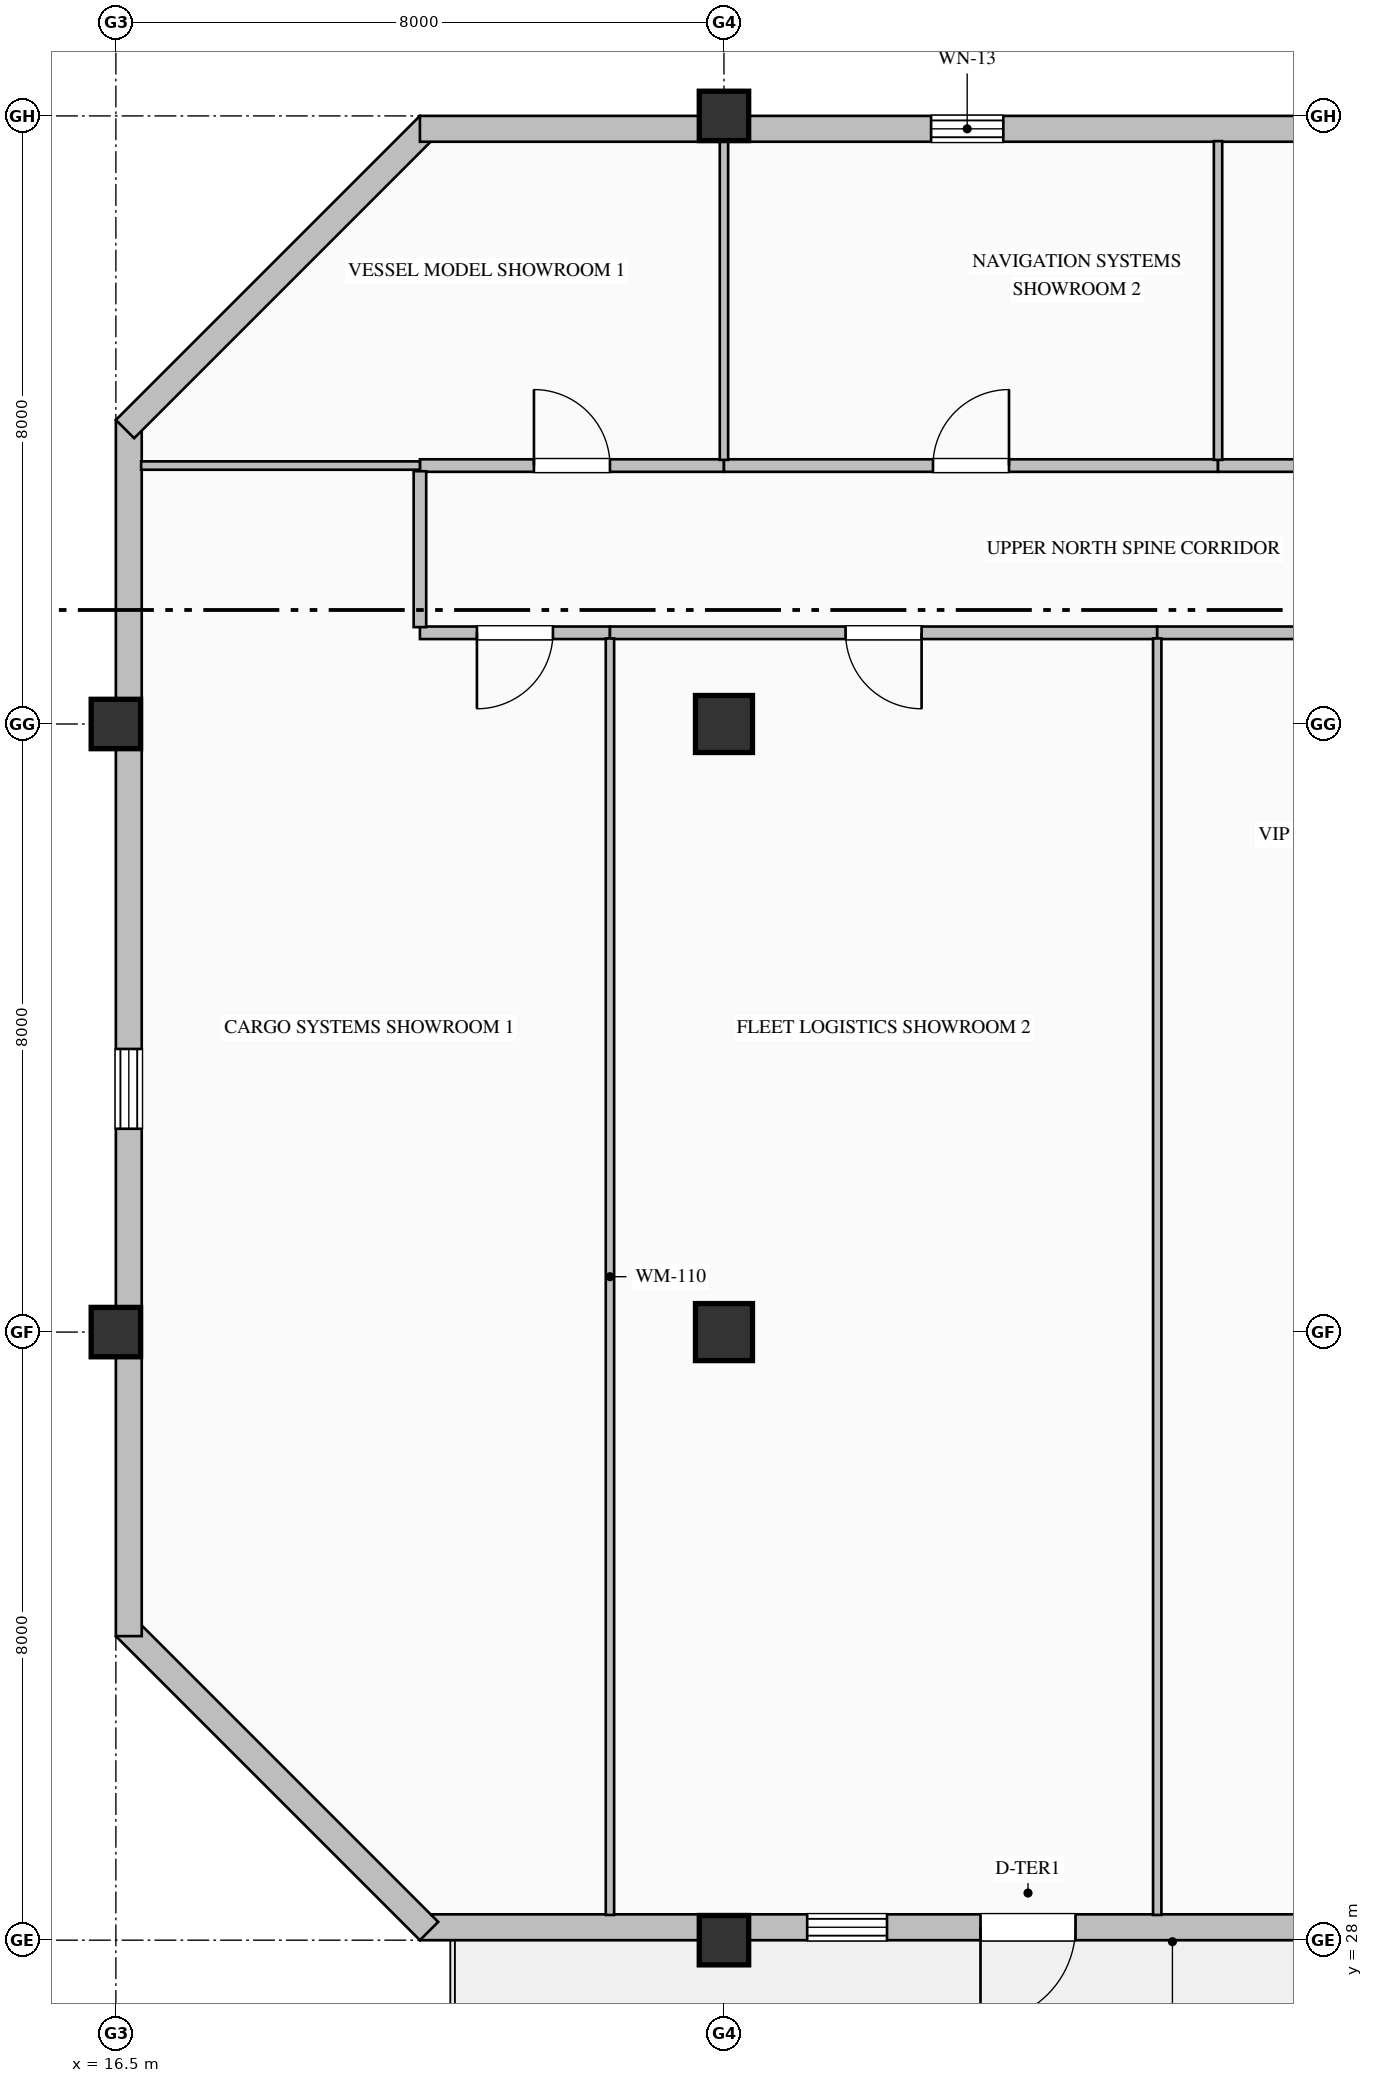
"""IFC4 building model, lengths in metres.
Left out: names, types, materials, properties, quantities, classifications, styles, units other than length and angle.
Written with IfcOpenShell. Run it as: python <this file> out.ifc"""

import sys

from ifc_helpers import new_model, si_unit, direction, frame, frame_2d, origin, origin_2d, place, context, subcontext, project, spatial, rectangle, hollow_rectangle, extrude, element, fill, save


model = new_model("IFC4")
c1 = context("Model", 3, precision=1e-05, world=origin(), true_north=direction((0.0, 1.0)))
c2 = subcontext(c1, "Body", "Model", "MODEL_VIEW")
j1 = project(units=[si_unit("LENGTHUNIT", "METRE"), si_unit("PLANEANGLEUNIT", "RADIAN")], contexts=[c1])
p1 = place(None, origin())
s1 = spatial("IfcSite", under=j1, at=p1, CompositionType="ELEMENT")
p2 = place(p1, origin())
s2 = spatial("IfcBuilding", under=s1, at=p2, CompositionType="ELEMENT")
p3 = place(p2, frame((0.0, 0.0, 359.2)))
s3 = spatial("IfcBuildingStorey", under=s2, at=p3, CompositionType="ELEMENT", Elevation=359.2)
for number, where, z_axis, x_axis in (
    (1, (16.5, 36.0, 0.0), (0.0, 0.0, 1.0), (1.0, 0.0, 0.0)),
    (2, (16.5, 44.0, 0.0), (0.0, 0.0, 1.0), (1.0, 0.0, 0.0)),
    (3, (24.5, 28.0, 0.0), (0.0, 0.0, 1.0), (1.0, 0.0, 0.0)),
):
    element("IfcColumn", number, at=place(p3, frame(where, z_axis=z_axis, x_axis=x_axis)), inside=s3, PredefinedType="COLUMN", context=c2, shape_type="SweptSolid", body=[
        extrude(hollow_rectangle(XDim=0.65, YDim=0.65, WallThickness=0.028, at=origin_2d()), origin(), (0.0, 0.0, 1.0), 4.0),
    ])
for number, where, z_axis, x_axis in (
    (4, (24.5, 36.0, 0.0), (0.0, 0.0, 1.0), (1.0, 0.0, 0.0)),
    (5, (24.5, 44.0, 0.0), (0.0, 0.0, 1.0), (1.0, 0.0, 0.0)),
):
    element("IfcColumn", number, at=place(p3, frame(where, z_axis=z_axis, x_axis=x_axis)), inside=s3, PredefinedType="COLUMN", context=c2, shape_type="SweptSolid", body=[
        extrude(rectangle(XDim=0.75, YDim=0.75, at=origin_2d()), origin(), (0.0, 0.0, 1.0), 4.0),
    ])
p4 = place(p3, frame((24.5, 52.0, 0.0), z_axis=(0.0, 0.0, 1.0), x_axis=(1.0, 0.0, 0.0)))
e6 = element("IfcColumn", 6, at=p4, inside=s3, PredefinedType="COLUMN", context=c2, shape_type="SweptSolid", body=[
    extrude(hollow_rectangle(XDim=0.65, YDim=0.65, WallThickness=0.028, at=origin_2d()), origin(), (0.0, 0.0, 1.0), 4.0),
])
p5 = place(p3, frame((40.52, 28.17, 0.0), z_axis=(0.0, 0.0, 1.0), x_axis=(-1.0, 0.0, 0.0)))
e7 = element("IfcWall", 7, at=p5, inside=s3, PredefinedType="SOLIDWALL", context=c2, shape_type="SweptSolid", body=[
    extrude(rectangle(XDim=20.02, YDim=0.34, at=frame_2d((10.01, 0.0))), origin(), (0.0, 0.0, 1.0), 3.185),
])
p6 = place(p5, frame((3.075, 0.0, 0.8)))
e8 = element("IfcOpeningElement", 8, at=p6, cuts=e7, PredefinedType="OPENING", context=c2, shape_type="SweptSolid", body=[
    extrude(rectangle(XDim=1.05, YDim=2.15, at=frame_2d((0.525, 1.075))), frame((0.0, 0.18, 0.0), z_axis=(0.0, -1.0, 0.0), x_axis=(1.0, 0.0, 0.0)), (0.0, 0.0, 1.0), 0.36),
])
p7 = place(p5, frame((13.875, 0.0, 0.8)))
e9 = element("IfcOpeningElement", 9, at=p7, cuts=e7, PredefinedType="OPENING", context=c2, shape_type="SweptSolid", body=[
    extrude(rectangle(XDim=1.05, YDim=2.15, at=frame_2d((0.525, 1.075))), frame((0.0, 0.18, 0.0), z_axis=(0.0, -1.0, 0.0), x_axis=(1.0, 0.0, 0.0)), (0.0, 0.0, 1.0), 0.36),
])
p8 = place(p5, frame((11.395, 0.0, 0.0)))
e10 = element("IfcOpeningElement", 10, at=p8, cuts=e7, PredefinedType="OPENING", context=c2, shape_type="SweptSolid", body=[
    extrude(rectangle(XDim=1.25, YDim=2.25, at=frame_2d((0.625, 1.125))), frame((0.0, 0.18, 0.0), z_axis=(0.0, -1.0, 0.0), x_axis=(1.0, 0.0, 0.0)), (0.0, 0.0, 1.0), 0.36),
])
p9 = place(p3, frame((20.62, 28.12, 0.0), z_axis=(0.0, 0.0, 1.0), x_axis=(-0.707106781187, 0.707106781187, 0.0)))
e11 = element("IfcWall", 11, at=p9, inside=s3, PredefinedType="SOLIDWALL", context=c2, shape_type="SweptSolid", body=[
    extrude(rectangle(XDim=5.657, YDim=0.34, at=frame_2d((2.828, 0.0))), origin(), (0.0, 0.0, 1.0), 3.785),
])
p10 = place(p3, frame((16.67, 32.0, 0.0), z_axis=(0.0, 0.0, 1.0), x_axis=(0.0, 1.0, 0.0)))
e12 = element("IfcWall", 12, at=p10, inside=s3, PredefinedType="SOLIDWALL", context=c2, shape_type="SweptSolid", body=[
    extrude(rectangle(XDim=16.0, YDim=0.34, at=frame_2d((8.0, 0.0))), origin(), (0.0, 0.0, 1.0), 3.335),
])
p11 = place(p10, frame((6.675, 0.0, 0.8)))
e13 = element("IfcOpeningElement", 13, at=p11, cuts=e12, PredefinedType="OPENING", context=c2, shape_type="SweptSolid", body=[
    extrude(rectangle(XDim=1.05, YDim=2.15, at=frame_2d((0.525, 1.075))), frame((0.0, 0.18, 0.0), z_axis=(0.0, -1.0, 0.0), x_axis=(1.0, 0.0, 0.0)), (0.0, 0.0, 1.0), 0.36),
])
p12 = place(p3, frame((16.62, 47.88, 0.0), z_axis=(0.0, 0.0, 1.0), x_axis=(0.707106781187, 0.707106781187, 0.0)))
e14 = element("IfcWall", 14, at=p12, inside=s3, PredefinedType="SOLIDWALL", context=c2, shape_type="SweptSolid", body=[
    extrude(rectangle(XDim=5.657, YDim=0.34, at=frame_2d((2.828, 0.0))), origin(), (0.0, 0.0, 1.0), 3.785),
])
p13 = place(p3, frame((20.5, 51.83, 0.0), z_axis=(0.0, 0.0, 1.0), x_axis=(1.0, 0.0, 0.0)))
e15 = element("IfcWall", 15, at=p13, inside=s3, PredefinedType="SOLIDWALL", context=c2, shape_type="SweptSolid", body=[
    extrude(rectangle(XDim=20.02, YDim=0.34, at=frame_2d((10.01, 0.0))), origin(), (0.0, 0.0, 1.0), 3.335),
])
p14 = place(p13, frame((6.725, 0.0, 0.9)))
e16 = element("IfcOpeningElement", 16, at=p14, cuts=e15, PredefinedType="OPENING", context=c2, shape_type="SweptSolid", body=[
    extrude(rectangle(XDim=0.95, YDim=1.85, at=frame_2d((0.475, 0.925))), frame((0.0, 0.18, 0.0), z_axis=(0.0, -1.0, 0.0), x_axis=(1.0, 0.0, 0.0)), (0.0, 0.0, 1.0), 0.36),
])
p15 = place(p3, frame((20.5, 47.4, 0.0), z_axis=(0.0, 0.0, 1.0), x_axis=(1.0, 0.0, 0.0)))
e17 = element("IfcWall", 17, at=p15, inside=s3, PredefinedType="PARTITIONING", context=c2, shape_type="SweptSolid", body=[
    extrude(rectangle(XDim=4.0, YDim=0.165, at=frame_2d((2.0, 0.0))), origin(), (0.0, 0.0, 1.0), 3.785),
])
p16 = place(p15, frame((1.5, 0.0, 0.0)))
e18 = element("IfcOpeningElement", 18, at=p16, cuts=e17, PredefinedType="OPENING", context=c2, shape_type="SweptSolid", body=[
    extrude(rectangle(XDim=1.0, YDim=2.15, at=frame_2d((0.5, 1.075))), frame((0.0, 0.093, 0.0), z_axis=(0.0, -1.0, 0.0), x_axis=(1.0, 0.0, 0.0)), (0.0, 0.0, 1.0), 0.185),
])
p17 = place(p3, frame((24.5, 47.4, 0.0), z_axis=(0.0, 0.0, 1.0), x_axis=(1.0, 0.0, 0.0)))
e19 = element("IfcWall", 19, at=p17, inside=s3, PredefinedType="PARTITIONING", context=c2, shape_type="SweptSolid", body=[
    extrude(rectangle(XDim=6.5, YDim=0.165, at=frame_2d((3.25, 0.0))), origin(), (0.0, 0.0, 1.0), 3.785),
])
p18 = place(p17, frame((2.75, 0.0, 0.0)))
e20 = element("IfcOpeningElement", 20, at=p18, cuts=e19, PredefinedType="OPENING", context=c2, shape_type="SweptSolid", body=[
    extrude(rectangle(XDim=1.0, YDim=2.15, at=frame_2d((0.5, 1.075))), frame((0.0, 0.093, 0.0), z_axis=(0.0, -1.0, 0.0), x_axis=(1.0, 0.0, 0.0)), (0.0, 0.0, 1.0), 0.185),
])
p19 = place(p3, frame((31.0, 47.4, 0.0), z_axis=(0.0, 0.0, 1.0), x_axis=(1.0, 0.0, 0.0)))
e21 = element("IfcWall", 21, at=p19, inside=s3, PredefinedType="PARTITIONING", context=c2, shape_type="SweptSolid", body=[
    extrude(rectangle(XDim=4.4, YDim=0.165, at=frame_2d((2.2, 0.0))), origin(), (0.0, 0.0, 1.0), 3.785),
])
p20 = place(p19, frame((1.7, 0.0, 0.0)))
e22 = element("IfcOpeningElement", 22, at=p20, cuts=e21, PredefinedType="OPENING", context=c2, shape_type="SweptSolid", body=[
    extrude(rectangle(XDim=1.0, YDim=2.15, at=frame_2d((0.5, 1.075))), frame((0.0, 0.093, 0.0), z_axis=(0.0, -1.0, 0.0), x_axis=(1.0, 0.0, 0.0)), (0.0, 0.0, 1.0), 0.185),
])
p21 = place(p3, frame((23.0, 45.2, 0.0), z_axis=(0.0, 0.0, 1.0), x_axis=(-1.0, 0.0, 0.0)))
e23 = element("IfcWall", 23, at=p21, inside=s3, PredefinedType="PARTITIONING", context=c2, shape_type="SweptSolid", body=[
    extrude(rectangle(XDim=2.5, YDim=0.165, at=frame_2d((1.25, 0.0))), origin(), (0.0, 0.0, 1.0), 3.785),
])
p22 = place(p21, frame((0.75, 0.0, 0.0)))
e24 = element("IfcOpeningElement", 24, at=p22, cuts=e23, PredefinedType="OPENING", context=c2, shape_type="SweptSolid", body=[
    extrude(rectangle(XDim=1.0, YDim=2.15, at=frame_2d((0.5, 1.075))), frame((0.0, 0.093, 0.0), z_axis=(0.0, -1.0, 0.0), x_axis=(1.0, 0.0, 0.0)), (0.0, 0.0, 1.0), 0.185),
])
p23 = place(p3, frame((20.5, 45.274, 0.0), z_axis=(0.0, 0.0, 1.0), x_axis=(0.0, 1.0, 0.0)))
e25 = element("IfcWall", 25, at=p23, inside=s3, PredefinedType="PARTITIONING", context=c2, shape_type="SweptSolid", body=[
    extrude(rectangle(XDim=2.051, YDim=0.165, at=frame_2d((1.025, 0.0))), origin(), (0.0, 0.0, 1.0), 3.785),
])
p24 = place(p3, frame((30.2, 45.2, 0.0), z_axis=(0.0, 0.0, 1.0), x_axis=(-1.0, 0.0, 0.0)))
e26 = element("IfcWall", 26, at=p24, inside=s3, PredefinedType="PARTITIONING", context=c2, shape_type="SweptSolid", body=[
    extrude(rectangle(XDim=7.2, YDim=0.165, at=frame_2d((3.6, 0.0))), origin(), (0.0, 0.0, 1.0), 3.785),
])
p25 = place(p24, frame((3.1, 0.0, 0.0)))
e27 = element("IfcOpeningElement", 27, at=p25, cuts=e26, PredefinedType="OPENING", context=c2, shape_type="SweptSolid", body=[
    extrude(rectangle(XDim=1.0, YDim=2.15, at=frame_2d((0.5, 1.075))), frame((0.0, 0.093, 0.0), z_axis=(0.0, -1.0, 0.0), x_axis=(1.0, 0.0, 0.0)), (0.0, 0.0, 1.0), 0.185),
])
p26 = place(p3, frame((35.4, 45.2, 0.0), z_axis=(0.0, 0.0, 1.0), x_axis=(-1.0, 0.0, 0.0)))
e28 = element("IfcWall", 28, at=p26, inside=s3, PredefinedType="PARTITIONING", context=c2, shape_type="SweptSolid", body=[
    extrude(rectangle(XDim=5.2, YDim=0.165, at=frame_2d((2.6, 0.0))), origin(), (0.0, 0.0, 1.0), 3.785),
])
p27 = place(p3, frame((24.5, 51.668, 0.0), z_axis=(0.0, 0.0, 1.0), x_axis=(0.0, -1.0, 0.0)))
e29 = element("IfcWall", 29, at=p27, inside=s3, PredefinedType="MOVABLE", context=c2, shape_type="SweptSolid", body=[
    extrude(rectangle(XDim=4.193, YDim=0.11, at=frame_2d((2.097, 0.0))), origin(), (0.0, 0.0, 1.0), 3.177),
])
p28 = place(p3, frame((20.5, 47.4, 0.0), z_axis=(0.0, 0.0, 1.0), x_axis=(-1.0, 0.0, 0.0)))
e30 = element("IfcWall", 30, at=p28, inside=s3, PredefinedType="MOVABLE", context=c2, shape_type="SweptSolid", body=[
    extrude(rectangle(XDim=3.668, YDim=0.11, at=frame_2d((1.834, 0.0))), origin(), (0.0, 0.0, 1.0), 3.785),
])
p29 = place(p3, frame((31.0, 51.668, 0.0), z_axis=(0.0, 0.0, 1.0), x_axis=(0.0, -1.0, 0.0)))
e31 = element("IfcWall", 31, at=p29, inside=s3, PredefinedType="MOVABLE", context=c2, shape_type="SweptSolid", body=[
    extrude(rectangle(XDim=4.193, YDim=0.11, at=frame_2d((2.097, 0.0))), origin(), (0.0, 0.0, 1.0), 3.785),
])
for number, where, z_axis, x_axis in (
    (32, (23.0, 45.125, 0.0), (0.0, 0.0, 1.0), (0.0, -1.0, 0.0)),
    (33, (30.2, 45.125, 0.0), (0.0, 0.0, 1.0), (0.0, -1.0, 0.0)),
):
    element("IfcWall", number, at=place(p3, frame(where, z_axis=z_axis, x_axis=x_axis)), inside=s3, PredefinedType="MOVABLE", context=c2, shape_type="SweptSolid", body=[
        extrude(rectangle(XDim=16.793, YDim=0.11, at=frame_2d((8.397, 0.0))), origin(), (0.0, 0.0, 1.0), 3.785),
    ])
p30 = place(p7, origin())
e34 = element("IfcWindow", 34, at=p30, inside=s3, PartitioningType="SINGLE_PANEL", PredefinedType="WINDOW", context=c2, shape_type="SweptSolid", body=[
    extrude(rectangle(XDim=1.05, YDim=2.15, at=frame_2d((0.525, 1.075))), frame((0.0, 0.15, 0.0), z_axis=(0.0, -1.0, 0.0), x_axis=(1.0, 0.0, 0.0)), (0.0, 0.0, 1.0), 0.06),
])
fill(e9, e34)
p31 = place(p11, origin())
e35 = element("IfcWindow", 35, at=p31, inside=s3, PartitioningType="SINGLE_PANEL", PredefinedType="WINDOW", context=c2, shape_type="SweptSolid", body=[
    extrude(rectangle(XDim=1.05, YDim=2.15, at=frame_2d((0.525, 1.075))), frame((0.0, 0.15, 0.0), z_axis=(0.0, -1.0, 0.0), x_axis=(1.0, 0.0, 0.0)), (0.0, 0.0, 1.0), 0.06),
])
fill(e13, e35)
p32 = place(p14, origin())
e36 = element("IfcWindow", 36, at=p32, inside=s3, PartitioningType="SINGLE_PANEL", PredefinedType="WINDOW", context=c2, shape_type="SweptSolid", body=[
    extrude(rectangle(XDim=0.95, YDim=1.85, at=frame_2d((0.475, 0.925))), frame((0.0, 0.15, 0.0), z_axis=(0.0, -1.0, 0.0), x_axis=(1.0, 0.0, 0.0)), (0.0, 0.0, 1.0), 0.06),
])
fill(e16, e36)
p33 = place(p8, origin())
e37 = element("IfcDoor", 37, at=p33, inside=s3, OperationType="SINGLE_SWING_RIGHT", PredefinedType="DOOR", context=c2, shape_type="SweptSolid", body=[
    extrude(rectangle(XDim=1.25, YDim=2.25, at=frame_2d((0.625, 1.125))), frame((0.0, 0.025, 0.0), z_axis=(0.0, -1.0, 0.0), x_axis=(1.0, 0.0, 0.0)), (0.0, 0.0, 1.0), 0.05),
])
fill(e10, e37)
p34 = place(p16, origin())
e38 = element("IfcDoor", 38, at=p34, inside=s3, OperationType="SINGLE_SWING_LEFT", PredefinedType="DOOR", context=c2, shape_type="SweptSolid", body=[
    extrude(rectangle(XDim=1.0, YDim=2.15, at=frame_2d((0.5, 1.075))), frame((0.0, 0.025, 0.0), z_axis=(0.0, -1.0, 0.0), x_axis=(1.0, 0.0, 0.0)), (0.0, 0.0, 1.0), 0.05),
])
fill(e18, e38)
p35 = place(p18, origin())
e39 = element("IfcDoor", 39, at=p35, inside=s3, OperationType="SINGLE_SWING_RIGHT", PredefinedType="DOOR", context=c2, shape_type="SweptSolid", body=[
    extrude(rectangle(XDim=1.0, YDim=2.15, at=frame_2d((0.5, 1.075))), frame((0.0, 0.025, 0.0), z_axis=(0.0, -1.0, 0.0), x_axis=(1.0, 0.0, 0.0)), (0.0, 0.0, 1.0), 0.05),
])
fill(e20, e39)
p36 = place(p22, origin())
e40 = element("IfcDoor", 40, at=p36, inside=s3, OperationType="SINGLE_SWING_RIGHT", PredefinedType="DOOR", context=c2, shape_type="SweptSolid", body=[
    extrude(rectangle(XDim=1.0, YDim=2.15, at=frame_2d((0.5, 1.075))), frame((0.0, 0.025, 0.0), z_axis=(0.0, -1.0, 0.0), x_axis=(1.0, 0.0, 0.0)), (0.0, 0.0, 1.0), 0.05),
])
fill(e24, e40)
p37 = place(p25, origin())
e41 = element("IfcDoor", 41, at=p37, inside=s3, OperationType="SINGLE_SWING_LEFT", PredefinedType="DOOR", context=c2, shape_type="SweptSolid", body=[
    extrude(rectangle(XDim=1.0, YDim=2.15, at=frame_2d((0.5, 1.075))), frame((0.0, 0.025, 0.0), z_axis=(0.0, -1.0, 0.0), x_axis=(1.0, 0.0, 0.0)), (0.0, 0.0, 1.0), 0.05),
])
fill(e27, e41)
save(model, sys.argv[1])
